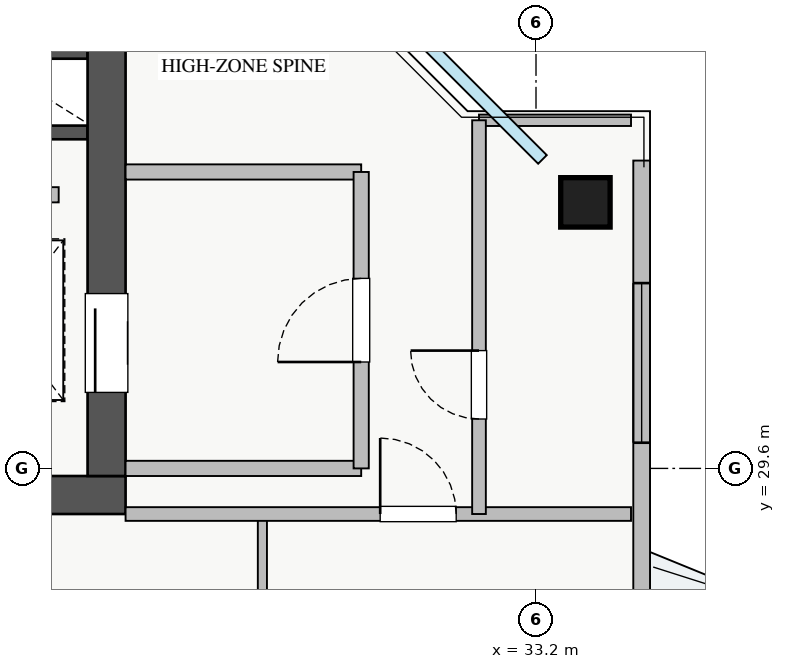
"""IFC4 building model, lengths in metres.
Left out: names, types, materials, properties, quantities, classifications, styles, units other than length and angle.
Written with IfcOpenShell. Run it as: python <this file> out.ifc"""

import sys

from ifc_helpers import new_model, si_unit, direction, frame, frame_2d, origin, origin_2d, place, context, subcontext, project, spatial, rectangle, extrude, source, transform, mapped, element, fill, save


model = new_model("IFC4")
c1 = context("Model", 3, precision=1e-05, world=origin(), true_north=direction((0.0, 1.0)))
c2 = subcontext(c1, "Body", "Model", "MODEL_VIEW")
j1 = project(units=[si_unit("LENGTHUNIT", "METRE"), si_unit("PLANEANGLEUNIT", "RADIAN")], contexts=[c1])
p1 = place(None, origin())
s1 = spatial("IfcSite", under=j1, at=p1, CompositionType="ELEMENT")
p2 = place(p1, origin())
s2 = spatial("IfcBuilding", under=s1, at=p2, CompositionType="ELEMENT")
p3 = place(p2, frame((0.0, 0.0, 247.0)))
s3 = spatial("IfcBuildingStorey", under=s2, at=p3, CompositionType="ELEMENT", Elevation=247.0)
for number, where, z_axis, x_axis in (
    (1, (25.8, 35.08, 0.0), (0.0, 0.0, 1.0), (1.0, 0.0, 0.0)),
    (2, (25.8, 34.02, 0.0), (0.0, 0.0, 1.0), (1.0, 0.0, 0.0)),
):
    element("IfcWall", number, at=place(p3, frame(where, z_axis=z_axis, x_axis=x_axis)), inside=s3, PredefinedType="SHEAR", context=c2, shape_type="SweptSolid", body=[
        extrude(rectangle(XDim=1.5, YDim=0.18, at=frame_2d((0.75, 0.0))), origin(), (0.0, 0.0, 1.0), 3.07),
    ])
p4 = place(p3, frame((10.2, 29.25, 0.0), z_axis=(0.0, 0.0, 1.0), x_axis=(1.0, 0.0, 0.0)))
e3 = element("IfcWall", 3, at=p4, inside=s3, PredefinedType="SHEAR", context=c2, shape_type="SweptSolid", body=[
    extrude(rectangle(XDim=17.6, YDim=0.5, at=frame_2d((8.8, 0.0))), origin(), (0.0, 0.0, 1.0), 3.25),
])
p5 = place(p3, frame((27.55, 29.5, 0.0), z_axis=(0.0, 0.0, 1.0), x_axis=(0.0, 1.0, 0.0)))
e4 = element("IfcWall", 4, at=p5, inside=s3, PredefinedType="SHEAR", context=c2, shape_type="SweptSolid", body=[
    extrude(rectangle(XDim=6.2, YDim=0.5, at=frame_2d((3.1, 0.0))), origin(), (0.0, 0.0, 1.0), 3.25),
])
p6 = place(p5, frame((1.1, 0.0, 0.0)))
e5 = element("IfcOpeningElement", 5, at=p6, cuts=e4, PredefinedType="OPENING", context=c2, shape_type="SweptSolid", body=[
    extrude(rectangle(XDim=1.3, YDim=2.05, at=frame_2d((0.65, 1.025))), frame((0.0, 0.26, 0.0), z_axis=(0.0, -1.0, 0.0), x_axis=(1.0, 0.0, 0.0)), (0.0, 0.0, 1.0), 0.52),
])
m1 = source(origin(), c2, "Body", "SweptSolid", [
    extrude(rectangle(XDim=0.65, YDim=0.65, at=origin_2d()), origin(), (0.0, 0.0, 1.0), 3.25),
])
p7 = place(p3, frame((33.85, 33.1, 0.0), z_axis=(0.0, 0.0, 1.0), x_axis=(1.0, 0.0, 0.0)))
e6 = element("IfcColumn", 6, at=p7, inside=s3, PredefinedType="COLUMN", context=c2, shape_type="MappedRepresentation", body=[
    mapped(m1, transform((0.0, 0.0, 0.0), x_axis=(1.0, 0.0, 0.0), y_axis=(0.0, 1.0, 0.0), z_axis=(0.0, 0.0, 1.0), scale=1.0)),
])
p8 = place(p3, frame((34.59, 12.35, 0.0), z_axis=(0.0, 0.0, 1.0), x_axis=(0.0, 1.0, 0.0)))
e7 = element("IfcWall", 7, at=p8, inside=s3, PredefinedType="STANDARD", context=c2, shape_type="SweptSolid", body=[
    extrude(rectangle(XDim=21.3, YDim=0.22, at=frame_2d((10.65, 0.0))), origin(), (0.0, 0.0, 1.0), 2.61),
])
p9 = place(p8, frame((11.5, 0.0, 0.0)))
e8 = element("IfcOpeningElement", 8, at=p9, cuts=e7, PredefinedType="OPENING", context=c2, shape_type="SweptSolid", body=[
    extrude(rectangle(XDim=1.2, YDim=2.1, at=frame_2d((0.6, 1.05))), frame((0.0, 0.12, 0.0), z_axis=(0.0, -1.0, 0.0), x_axis=(1.0, 0.0, 0.0)), (0.0, 0.0, 1.0), 0.24),
])
p10 = place(p8, frame((1.463, 0.0, 0.9)))
e9 = element("IfcOpeningElement", 9, at=p10, cuts=e7, PredefinedType="OPENING", context=c2, shape_type="SweptSolid", body=[
    extrude(rectangle(XDim=2.4, YDim=1.48, at=frame_2d((1.2, 0.74))), frame((0.0, 0.12, 0.0), z_axis=(0.0, -1.0, 0.0), x_axis=(1.0, 0.0, 0.0)), (0.0, 0.0, 1.0), 0.24),
])
p11 = place(p8, frame((17.588, 0.0, 0.9)))
e10 = element("IfcOpeningElement", 10, at=p11, cuts=e7, PredefinedType="OPENING", context=c2, shape_type="SweptSolid", body=[
    extrude(rectangle(XDim=2.1, YDim=1.48, at=frame_2d((1.05, 0.74))), frame((0.0, 0.12, 0.0), z_axis=(0.0, -1.0, 0.0), x_axis=(1.0, 0.0, 0.0)), (0.0, 0.0, 1.0), 0.24),
])
p12 = place(p8, frame((4.9, 0.0, 0.9)))
e11 = element("IfcOpeningElement", 11, at=p12, cuts=e7, PredefinedType="OPENING", context=c2, shape_type="SweptSolid", body=[
    extrude(rectangle(XDim=0.9, YDim=1.2, at=frame_2d((0.45, 0.6))), frame((0.0, 0.12, 0.0), z_axis=(0.0, -1.0, 0.0), x_axis=(1.0, 0.0, 0.0)), (0.0, 0.0, 1.0), 0.24),
])
p13 = place(p8, frame((9.685, 0.0, 0.9)))
e12 = element("IfcOpeningElement", 12, at=p13, cuts=e7, PredefinedType="OPENING", context=c2, shape_type="SweptSolid", body=[
    extrude(rectangle(XDim=0.9, YDim=1.2, at=frame_2d((0.45, 0.6))), frame((0.0, 0.12, 0.0), z_axis=(0.0, -1.0, 0.0), x_axis=(1.0, 0.0, 0.0)), (0.0, 0.0, 1.0), 0.24),
])
for number, where, z_axis, x_axis in (
    (13, (27.8, 29.6, 0.0), (0.0, 0.0, 1.0), (1.0, 0.0, 0.0)),
    (14, (27.8, 33.5, 0.0), (0.0, 0.0, 1.0), (1.0, 0.0, 0.0)),
):
    element("IfcWall", number, at=place(p3, frame(where, z_axis=z_axis, x_axis=x_axis)), inside=s3, PredefinedType="PARTITIONING", context=c2, shape_type="SweptSolid", body=[
        extrude(rectangle(XDim=3.1, YDim=0.2, at=frame_2d((1.55, 0.0))), origin(), (0.0, 0.0, 1.0), 3.07),
    ])
p14 = place(p3, frame((30.9, 29.6, 0.0), z_axis=(0.0, 0.0, 1.0), x_axis=(0.0, 1.0, 0.0)))
e15 = element("IfcWall", 15, at=p14, inside=s3, PredefinedType="PARTITIONING", context=c2, shape_type="SweptSolid", body=[
    extrude(rectangle(XDim=3.9, YDim=0.2, at=frame_2d((1.95, 0.0))), origin(), (0.0, 0.0, 1.0), 2.715),
])
p15 = place(p14, frame((1.4, 0.0, 0.0)))
e16 = element("IfcOpeningElement", 16, at=p15, cuts=e15, PredefinedType="OPENING", context=c2, shape_type="SweptSolid", body=[
    extrude(rectangle(XDim=1.1, YDim=2.05, at=frame_2d((0.55, 1.025))), frame((0.0, 0.11, 0.0), z_axis=(0.0, -1.0, 0.0), x_axis=(1.0, 0.0, 0.0)), (0.0, 0.0, 1.0), 0.22),
])
p16 = place(p3, frame((21.75, 33.2, 0.0), z_axis=(0.0, 0.0, 1.0), x_axis=(1.0, 0.0, 0.0)))
e17 = element("IfcWall", 17, at=p16, inside=s3, PredefinedType="PARTITIONING", context=c2, shape_type="SweptSolid", body=[
    extrude(rectangle(XDim=5.17, YDim=0.2, at=frame_2d((2.585, 0.0))), origin(), (0.0, 0.0, 1.0), 3.07),
])
p17 = place(p3, frame((29.6, 21.8, 0.0), z_axis=(0.0, 0.0, 1.0), x_axis=(0.0, 1.0, 0.0)))
e18 = element("IfcWall", 18, at=p17, inside=s3, PredefinedType="PLUMBINGWALL", context=c2, shape_type="SweptSolid", body=[
    extrude(rectangle(XDim=7.2, YDim=0.12, at=frame_2d((3.6, 0.0))), origin(), (0.0, 0.0, 1.0), 3.07),
])
p18 = place(p17, frame((1.035, 0.0, 0.0)))
e19 = element("IfcOpeningElement", 19, at=p18, cuts=e18, PredefinedType="OPENING", context=c2, shape_type="SweptSolid", body=[
    extrude(rectangle(XDim=0.85, YDim=2.05, at=frame_2d((0.425, 1.025))), frame((0.0, 0.07, 0.0), z_axis=(0.0, -1.0, 0.0), x_axis=(1.0, 0.0, 0.0)), (0.0, 0.0, 1.0), 0.14),
])
p19 = place(p17, frame((4.57, 0.0, 0.0)))
e20 = element("IfcOpeningElement", 20, at=p19, cuts=e18, PredefinedType="OPENING", context=c2, shape_type="SweptSolid", body=[
    extrude(rectangle(XDim=0.9, YDim=2.05, at=frame_2d((0.45, 1.025))), frame((0.0, 0.07, 0.0), z_axis=(0.0, -1.0, 0.0), x_axis=(1.0, 0.0, 0.0)), (0.0, 0.0, 1.0), 0.14),
])
p20 = place(p3, frame((27.8, 29.0, 0.0), z_axis=(0.0, 0.0, 1.0), x_axis=(1.0, 0.0, 0.0)))
e21 = element("IfcWall", 21, at=p20, inside=s3, PredefinedType="PARTITIONING", context=c2, shape_type="SweptSolid", body=[
    extrude(rectangle(XDim=6.65, YDim=0.18, at=frame_2d((3.325, 0.0))), origin(), (0.0, 0.0, 1.0), 3.07),
])
p21 = place(p20, frame((3.35, 0.0, 0.0)))
e22 = element("IfcOpeningElement", 22, at=p21, cuts=e21, PredefinedType="OPENING", context=c2, shape_type="SweptSolid", body=[
    extrude(rectangle(XDim=1.0, YDim=2.05, at=frame_2d((0.5, 1.025))), frame((0.0, 0.1, 0.0), z_axis=(0.0, -1.0, 0.0), x_axis=(1.0, 0.0, 0.0)), (0.0, 0.0, 1.0), 0.2),
])
p22 = place(p3, frame((32.45, 34.18, 0.0), z_axis=(0.0, 0.0, 1.0), x_axis=(1.0, 0.0, 0.0)))
e23 = element("IfcWall", 23, at=p22, inside=s3, PredefinedType="PARTITIONING", context=c2, shape_type="SweptSolid", body=[
    extrude(rectangle(XDim=2.0, YDim=0.15, at=frame_2d((1.0, 0.0))), origin(), (0.0, 0.0, 1.0), 3.07),
])
p23 = place(p3, frame((32.45, 29.0, 0.0), z_axis=(0.0, 0.0, 1.0), x_axis=(0.0, 1.0, 0.0)))
e24 = element("IfcWall", 24, at=p23, inside=s3, PredefinedType="PARTITIONING", context=c2, shape_type="SweptSolid", body=[
    extrude(rectangle(XDim=5.18, YDim=0.18, at=frame_2d((2.59, 0.0))), origin(), (0.0, 0.0, 1.0), 3.07),
])
p24 = place(p23, frame((1.25, 0.0, 0.0)))
e25 = element("IfcOpeningElement", 25, at=p24, cuts=e24, PredefinedType="OPENING", context=c2, shape_type="SweptSolid", body=[
    extrude(rectangle(XDim=0.9, YDim=2.05, at=frame_2d((0.45, 1.025))), frame((0.0, 0.1, 0.0), z_axis=(0.0, -1.0, 0.0), x_axis=(1.0, 0.0, 0.0)), (0.0, 0.0, 1.0), 0.2),
])
m2 = source(origin(), c2, "Body", "SweptSolid", [
    extrude(rectangle(XDim=2.1, YDim=1.48, at=frame_2d((1.05, 0.74))), frame((0.0, 0.03, 0.0), z_axis=(0.0, -1.0, 0.0), x_axis=(1.0, 0.0, 0.0)), (0.0, 0.0, 1.0), 0.06),
])
p25 = place(p11, origin())
e26 = element("IfcWindow", 26, at=p25, inside=s3, PartitioningType="TRIPLE_PANEL_VERTICAL", PredefinedType="WINDOW", context=c2, shape_type="MappedRepresentation", body=[
    mapped(m2, transform((0.0, 0.0, 0.0), x_axis=(1.0, 0.0, 0.0), y_axis=(0.0, 1.0, 0.0), z_axis=(0.0, 0.0, 1.0), scale=1.0)),
])
fill(e10, e26)
m3 = source(origin(), c2, "Body", "SweptSolid", [
    extrude(rectangle(XDim=1.3, YDim=2.05, at=frame_2d((0.65, 1.025))), frame((0.0, 0.025, 0.0), z_axis=(0.0, -1.0, 0.0), x_axis=(1.0, 0.0, 0.0)), (0.0, 0.0, 1.0), 0.05),
])
p26 = place(p6, origin())
e27 = element("IfcDoor", 27, at=p26, inside=s3, OperationType="SLIDING_TO_LEFT", PredefinedType="DOOR", context=c2, shape_type="MappedRepresentation", body=[
    mapped(m3, transform((0.0, 0.0, 0.0), x_axis=(1.0, 0.0, 0.0), y_axis=(0.0, 1.0, 0.0), z_axis=(0.0, 0.0, 1.0), scale=1.0)),
])
fill(e5, e27)
m4 = source(origin(), c2, "Body", "SweptSolid", [
    extrude(rectangle(XDim=1.1, YDim=2.05, at=frame_2d((0.55, 1.025))), frame((0.0, 0.025, 0.0), z_axis=(0.0, -1.0, 0.0), x_axis=(1.0, 0.0, 0.0)), (0.0, 0.0, 1.0), 0.05),
])
p27 = place(p15, origin())
e28 = element("IfcDoor", 28, at=p27, inside=s3, OperationType="SINGLE_SWING_LEFT", PredefinedType="DOOR", context=c2, shape_type="MappedRepresentation", body=[
    mapped(m4, transform((0.0, 0.0, 0.0), x_axis=(1.0, 0.0, 0.0), y_axis=(0.0, 1.0, 0.0), z_axis=(0.0, 0.0, 1.0), scale=1.0)),
])
fill(e16, e28)
m5 = source(origin(), c2, "Body", "SweptSolid", [
    extrude(rectangle(XDim=1.0, YDim=2.05, at=frame_2d((0.5, 1.025))), frame((0.0, 0.025, 0.0), z_axis=(0.0, -1.0, 0.0), x_axis=(1.0, 0.0, 0.0)), (0.0, 0.0, 1.0), 0.05),
])
p28 = place(p21, origin())
e29 = element("IfcDoor", 29, at=p28, inside=s3, OperationType="SINGLE_SWING_LEFT", PredefinedType="DOOR", context=c2, shape_type="MappedRepresentation", body=[
    mapped(m5, transform((0.0, 0.0, 0.0), x_axis=(1.0, 0.0, 0.0), y_axis=(0.0, 1.0, 0.0), z_axis=(0.0, 0.0, 1.0), scale=1.0)),
])
fill(e22, e29)
m6 = source(origin(), c2, "Body", "SweptSolid", [
    extrude(rectangle(XDim=0.9, YDim=2.05, at=frame_2d((0.45, 1.025))), frame((0.0, 0.025, 0.0), z_axis=(0.0, -1.0, 0.0), x_axis=(1.0, 0.0, 0.0)), (0.0, 0.0, 1.0), 0.05),
])
p29 = place(p24, origin())
e30 = element("IfcDoor", 30, at=p29, inside=s3, OperationType="SINGLE_SWING_RIGHT", PredefinedType="DOOR", context=c2, shape_type="MappedRepresentation", body=[
    mapped(m6, transform((0.0, 0.0, 0.0), x_axis=(1.0, 0.0, 0.0), y_axis=(0.0, 1.0, 0.0), z_axis=(0.0, 0.0, 1.0), scale=1.0)),
])
fill(e25, e30)
save(model, sys.argv[1])
